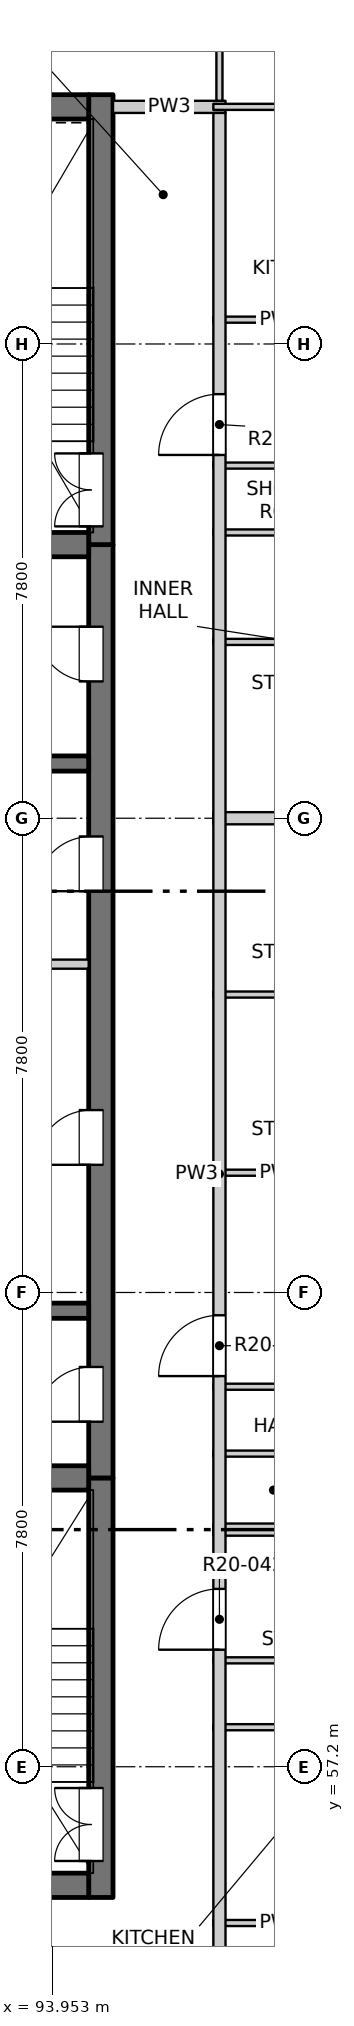
"""IFC4 building model, lengths in metres.
Left out: names, types, materials, properties, quantities, classifications, styles, units other than length and angle.
Written with IfcOpenShell. Run it as: python <this file> out.ifc"""

import sys

from ifc_helpers import new_model, si_unit, direction, frame, frame_2d, origin, place, context, subcontext, project, spatial, rectangle, extrude, element, fill, save


model = new_model("IFC4")
c1 = context("Model", 3, precision=1e-05, world=origin(), true_north=direction((0.0, 1.0)))
c2 = subcontext(c1, "Body", "Model", "MODEL_VIEW")
j1 = project(units=[si_unit("LENGTHUNIT", "METRE"), si_unit("PLANEANGLEUNIT", "RADIAN")], contexts=[c1])
p1 = place(None, origin())
s1 = spatial("IfcSite", under=j1, at=p1, CompositionType="ELEMENT")
p2 = place(p1, origin())
s2 = spatial("IfcBuilding", under=s1, at=p2, CompositionType="ELEMENT")
p3 = place(p2, frame((0.0, 0.0, 204.1)))
s3 = spatial("IfcBuildingStorey", under=s2, at=p3, CompositionType="ELEMENT", Elevation=204.1)
p4 = place(p3, frame((94.75, 55.05, -0.25), z_axis=(0.0, 0.0, 1.0), x_axis=(0.0, 1.0, 0.0)))
e1 = element("IfcWall", 1, at=p4, inside=s3, PredefinedType="SOLIDWALL", context=c2, shape_type="SweptSolid", body=[
    extrude(rectangle(XDim=6.9, YDim=0.4, at=frame_2d((3.45, 0.0))), origin(), (0.0, 0.0, 1.0), 3.4),
])
p5 = place(p4, frame((0.6, 0.0, 0.25)))
e2 = element("IfcOpeningElement", 2, at=p5, cuts=e1, PredefinedType="OPENING", context=c2, shape_type="SweptSolid", body=[
    extrude(rectangle(XDim=1.2, YDim=2.1, at=frame_2d((0.6, 1.05))), frame((0.0, 0.21, 0.0), z_axis=(0.0, -1.0, 0.0), x_axis=(1.0, 0.0, 0.0)), (0.0, 0.0, 1.0), 0.42),
])
p6 = place(p3, frame((94.75, 61.95, -0.25), z_axis=(0.0, 0.0, 1.0), x_axis=(0.0, 1.0, 0.0)))
e3 = element("IfcWall", 3, at=p6, inside=s3, PredefinedType="SOLIDWALL", context=c2, shape_type="SweptSolid", body=[
    extrude(rectangle(XDim=15.35, YDim=0.4, at=frame_2d((7.675, 0.0))), origin(), (0.0, 0.0, 1.0), 3.4),
])
p7 = place(p6, frame((0.925, 0.0, 0.25)))
e4 = element("IfcOpeningElement", 4, at=p7, cuts=e3, PredefinedType="OPENING", context=c2, shape_type="SweptSolid", body=[
    extrude(rectangle(XDim=0.9, YDim=2.1, at=frame_2d((0.45, 1.05))), frame((0.0, 0.21, 0.0), z_axis=(0.0, -1.0, 0.0), x_axis=(1.0, 0.0, 0.0)), (0.0, 0.0, 1.0), 0.42),
])
p8 = place(p6, frame((5.15, 0.0, 0.25)))
e5 = element("IfcOpeningElement", 5, at=p8, cuts=e3, PredefinedType="OPENING", context=c2, shape_type="SweptSolid", body=[
    extrude(rectangle(XDim=0.9, YDim=2.1, at=frame_2d((0.45, 1.05))), frame((0.0, 0.21, 0.0), z_axis=(0.0, -1.0, 0.0), x_axis=(1.0, 0.0, 0.0)), (0.0, 0.0, 1.0), 0.42),
])
p9 = place(p6, frame((9.65, 0.0, 0.25)))
e6 = element("IfcOpeningElement", 6, at=p9, cuts=e3, PredefinedType="OPENING", context=c2, shape_type="SweptSolid", body=[
    extrude(rectangle(XDim=0.9, YDim=2.1, at=frame_2d((0.45, 1.05))), frame((0.0, 0.21, 0.0), z_axis=(0.0, -1.0, 0.0), x_axis=(1.0, 0.0, 0.0)), (0.0, 0.0, 1.0), 0.42),
])
p10 = place(p6, frame((13.1, 0.0, 0.25)))
e7 = element("IfcOpeningElement", 7, at=p10, cuts=e3, PredefinedType="OPENING", context=c2, shape_type="SweptSolid", body=[
    extrude(rectangle(XDim=0.9, YDim=2.1, at=frame_2d((0.45, 1.05))), frame((0.0, 0.21, 0.0), z_axis=(0.0, -1.0, 0.0), x_axis=(1.0, 0.0, 0.0)), (0.0, 0.0, 1.0), 0.42),
])
p11 = place(p3, frame((94.75, 77.3, -0.25), z_axis=(0.0, 0.0, 1.0), x_axis=(0.0, 1.0, 0.0)))
e8 = element("IfcWall", 8, at=p11, inside=s3, PredefinedType="SOLIDWALL", context=c2, shape_type="SweptSolid", body=[
    extrude(rectangle(XDim=7.4, YDim=0.4, at=frame_2d((3.7, 0.0))), origin(), (0.0, 0.0, 1.0), 3.4),
])
p12 = place(p11, frame((0.3, 0.0, 0.25)))
e9 = element("IfcOpeningElement", 9, at=p12, cuts=e8, PredefinedType="OPENING", context=c2, shape_type="SweptSolid", body=[
    extrude(rectangle(XDim=1.2, YDim=2.1, at=frame_2d((0.6, 1.05))), frame((0.0, 0.21, 0.0), z_axis=(0.0, -1.0, 0.0), x_axis=(1.0, 0.0, 0.0)), (0.0, 0.0, 1.0), 0.42),
])
p13 = place(p3, frame((75.45, 55.25, -0.25), z_axis=(0.0, 0.0, 1.0), x_axis=(1.0, 0.0, 0.0)))
e10 = element("IfcWall", 10, at=p13, inside=s3, PredefinedType="SOLIDWALL", context=c2, shape_type="SweptSolid", body=[
    extrude(rectangle(XDim=19.1, YDim=0.4, at=frame_2d((9.55, 0.0))), origin(), (0.0, 0.0, 1.0), 3.4),
])
p14 = place(p13, frame((8.8, 0.0, 0.25)))
e11 = element("IfcOpeningElement", 11, at=p14, cuts=e10, PredefinedType="OPENING", context=c2, shape_type="SweptSolid", body=[
    extrude(rectangle(XDim=1.5, YDim=2.1, at=frame_2d((0.75, 1.05))), frame((0.0, 0.21, 0.0), z_axis=(0.0, -1.0, 0.0), x_axis=(1.0, 0.0, 0.0)), (0.0, 0.0, 1.0), 0.42),
])
p15 = place(p3, frame((75.45, 84.5, -0.25), z_axis=(0.0, 0.0, 1.0), x_axis=(1.0, 0.0, 0.0)))
e12 = element("IfcWall", 12, at=p15, inside=s3, PredefinedType="SOLIDWALL", context=c2, shape_type="SweptSolid", body=[
    extrude(rectangle(XDim=19.1, YDim=0.4, at=frame_2d((9.55, 0.0))), origin(), (0.0, 0.0, 1.0), 3.4),
])
p16 = place(p3, frame((90.675, 61.95, -0.25), z_axis=(0.0, 0.0, 1.0), x_axis=(1.0, 0.0, 0.0)))
e13 = element("IfcWall", 13, at=p16, inside=s3, PredefinedType="SOLIDWALL", context=c2, shape_type="SweptSolid", body=[
    extrude(rectangle(XDim=3.875, YDim=0.4, at=frame_2d((1.938, 0.0))), origin(), (0.0, 0.0, 1.0), 3.4),
])
for number, where, z_axis, x_axis in (
    (14, (90.675, 64.7, -0.25), (0.0, 0.0, 1.0), (1.0, 0.0, 0.0)),
    (15, (90.675, 73.7, -0.25), (0.0, 0.0, 1.0), (1.0, 0.0, 0.0)),
):
    element("IfcWall", number, at=place(p3, frame(where, z_axis=z_axis, x_axis=x_axis)), inside=s3, PredefinedType="SOLIDWALL", context=c2, shape_type="SweptSolid", body=[
        extrude(rectangle(XDim=3.875, YDim=0.25, at=frame_2d((1.938, 0.0))), origin(), (0.0, 0.0, 1.0), 3.4),
    ])
p17 = place(p3, frame((90.675, 77.3, -0.25), z_axis=(0.0, 0.0, 1.0), x_axis=(1.0, 0.0, 0.0)))
e16 = element("IfcWall", 16, at=p17, inside=s3, PredefinedType="SOLIDWALL", context=c2, shape_type="SweptSolid", body=[
    extrude(rectangle(XDim=3.875, YDim=0.4, at=frame_2d((1.938, 0.0))), origin(), (0.0, 0.0, 1.0), 3.4),
])
for number, where, z_axis, x_axis in (
    (17, (96.6, 54.63, 0.0), (0.0, 0.0, 1.0), (1.0, 0.0, 0.0)),
    (18, (96.6, 57.85, 0.0), (0.0, 0.0, 1.0), (1.0, 0.0, 0.0)),
    (19, (96.6, 58.95, 0.0), (0.0, 0.0, 1.0), (1.0, 0.0, 0.0)),
):
    element("IfcWall", number, at=place(p3, frame(where, z_axis=z_axis, x_axis=x_axis)), inside=s3, PredefinedType="PARTITIONING", context=c2, shape_type="SweptSolid", body=[
        extrude(rectangle(XDim=2.22, YDim=0.1, at=frame_2d((1.11, 0.0))), origin(), (0.0, 0.0, 1.0), 3.15),
    ])
p18 = place(p3, frame((96.6, 61.1, 0.0), z_axis=(0.0, 0.0, 1.0), x_axis=(1.0, 0.0, 0.0)))
e20 = element("IfcWall", 20, at=p18, inside=s3, PredefinedType="PARTITIONING", context=c2, shape_type="SweptSolid", body=[
    extrude(rectangle(XDim=11.5, YDim=0.2, at=frame_2d((5.75, 0.0))), origin(), (0.0, 0.0, 1.0), 2.55),
])
for number, where, z_axis, x_axis in (
    (21, (96.6, 62.35, 0.0), (0.0, 0.0, 1.0), (1.0, 0.0, 0.0)),
    (22, (96.6, 63.45, 0.0), (0.0, 0.0, 1.0), (1.0, 0.0, 0.0)),
    (23, (96.6, 66.97, 0.0), (0.0, 0.0, 1.0), (1.0, 0.0, 0.0)),
    (24, (96.6, 69.9, 0.0), (0.0, 0.0, 1.0), (1.0, 0.0, 0.0)),
):
    element("IfcWall", number, at=place(p3, frame(where, z_axis=z_axis, x_axis=x_axis)), inside=s3, PredefinedType="PARTITIONING", context=c2, shape_type="SweptSolid", body=[
        extrude(rectangle(XDim=2.22, YDim=0.1, at=frame_2d((1.11, 0.0))), origin(), (0.0, 0.0, 1.0), 3.15),
    ])
p19 = place(p3, frame((90.675, 70.4, 0.0), z_axis=(0.0, 0.0, 1.0), x_axis=(1.0, 0.0, 0.0)))
e25 = element("IfcWall", 25, at=p19, inside=s3, PredefinedType="PARTITIONING", context=c2, shape_type="SweptSolid", body=[
    extrude(rectangle(XDim=3.875, YDim=0.15, at=frame_2d((1.938, 0.0))), origin(), (0.0, 0.0, 1.0), 3.15),
])
p20 = place(p3, frame((96.6, 72.8, 0.0), z_axis=(0.0, 0.0, 1.0), x_axis=(1.0, 0.0, 0.0)))
e26 = element("IfcWall", 26, at=p20, inside=s3, PredefinedType="PARTITIONING", context=c2, shape_type="SweptSolid", body=[
    extrude(rectangle(XDim=11.5, YDim=0.2, at=frame_2d((5.75, 0.0))), origin(), (0.0, 0.0, 1.0), 3.15),
])
for number, where, z_axis, x_axis in (
    (27, (96.6, 75.7, 0.0), (0.0, 0.0, 1.0), (1.0, 0.0, 0.0)),
    (28, (96.6, 77.5, 0.0), (0.0, 0.0, 1.0), (1.0, 0.0, 0.0)),
    (29, (96.6, 78.6, 0.0), (0.0, 0.0, 1.0), (1.0, 0.0, 0.0)),
    (30, (96.6, 81.0, 0.0), (0.0, 0.0, 1.0), (1.0, 0.0, 0.0)),
):
    element("IfcWall", number, at=place(p3, frame(where, z_axis=z_axis, x_axis=x_axis)), inside=s3, PredefinedType="PARTITIONING", context=c2, shape_type="SweptSolid", body=[
        extrude(rectangle(XDim=2.22, YDim=0.1, at=frame_2d((1.11, 0.0))), origin(), (0.0, 0.0, 1.0), 3.15),
    ])
p21 = place(p3, frame((94.95, 84.5, 0.0), z_axis=(0.0, 0.0, 1.0), x_axis=(1.0, 0.0, 0.0)))
e31 = element("IfcWall", 31, at=p21, inside=s3, PredefinedType="PARTITIONING", context=c2, shape_type="SweptSolid", body=[
    extrude(rectangle(XDim=1.85, YDim=0.2, at=frame_2d((0.925, 0.0))), origin(), (0.0, 0.0, 1.0), 3.15),
])
p22 = place(p3, frame((96.6, 84.5, 0.0), z_axis=(0.0, 0.0, 1.0), x_axis=(1.0, 0.0, 0.0)))
e32 = element("IfcWall", 32, at=p22, inside=s3, PredefinedType="PARTITIONING", context=c2, shape_type="SweptSolid", body=[
    extrude(rectangle(XDim=11.5, YDim=0.1, at=frame_2d((5.75, 0.0))), origin(), (0.0, 0.0, 1.0), 3.15),
])
p23 = place(p22, frame((2.635, 0.0, 0.0)))
e33 = element("IfcOpeningElement", 33, at=p23, cuts=e32, PredefinedType="OPENING", context=c2, shape_type="SweptSolid", body=[
    extrude(rectangle(XDim=0.9, YDim=2.1, at=frame_2d((0.45, 1.05))), frame((0.0, 0.06, 0.0), z_axis=(0.0, -1.0, 0.0), x_axis=(1.0, 0.0, 0.0)), (0.0, 0.0, 1.0), 0.12),
])
p24 = place(p3, frame((96.7, 49.5, 0.0), z_axis=(0.0, 0.0, 1.0), x_axis=(0.0, 1.0, 0.0)))
e34 = element("IfcWall", 34, at=p24, inside=s3, PredefinedType="PARTITIONING", context=c2, shape_type="SweptSolid", body=[
    extrude(rectangle(XDim=34.9, YDim=0.2, at=frame_2d((17.45, 0.0))), origin(), (0.0, 0.0, 1.0), 3.15),
])
p25 = place(p24, frame((9.625, 0.0, 0.0)))
e35 = element("IfcOpeningElement", 35, at=p25, cuts=e34, PredefinedType="OPENING", context=c2, shape_type="SweptSolid", body=[
    extrude(rectangle(XDim=1.0, YDim=2.1, at=frame_2d((0.5, 1.05))), frame((0.0, 0.11, 0.0), z_axis=(0.0, -1.0, 0.0), x_axis=(1.0, 0.0, 0.0)), (0.0, 0.0, 1.0), 0.22),
])
p26 = place(p24, frame((14.125, 0.0, 0.0)))
e36 = element("IfcOpeningElement", 36, at=p26, cuts=e34, PredefinedType="OPENING", context=c2, shape_type="SweptSolid", body=[
    extrude(rectangle(XDim=1.0, YDim=2.1, at=frame_2d((0.5, 1.05))), frame((0.0, 0.11, 0.0), z_axis=(0.0, -1.0, 0.0), x_axis=(1.0, 0.0, 0.0)), (0.0, 0.0, 1.0), 0.22),
])
p27 = place(p24, frame((29.275, 0.0, 0.0)))
e37 = element("IfcOpeningElement", 37, at=p27, cuts=e34, PredefinedType="OPENING", context=c2, shape_type="SweptSolid", body=[
    extrude(rectangle(XDim=1.0, YDim=2.1, at=frame_2d((0.5, 1.05))), frame((0.0, 0.11, 0.0), z_axis=(0.0, -1.0, 0.0), x_axis=(1.0, 0.0, 0.0)), (0.0, 0.0, 1.0), 0.22),
])
p28 = place(p3, frame((96.7, 84.6, 0.0), z_axis=(0.0, 0.0, 1.0), x_axis=(0.0, 1.0, 0.0)))
e38 = element("IfcWall", 38, at=p28, inside=s3, PredefinedType="PARTITIONING", context=c2, shape_type="SweptSolid", body=[
    extrude(rectangle(XDim=3.5, YDim=0.1, at=frame_2d((1.75, 0.0))), origin(), (0.0, 0.0, 1.0), 3.15),
])
p29 = place(p28, frame((1.4, 0.0, 0.0)))
e39 = element("IfcOpeningElement", 39, at=p29, cuts=e38, PredefinedType="OPENING", context=c2, shape_type="SweptSolid", body=[
    extrude(rectangle(XDim=0.9, YDim=2.1, at=frame_2d((0.45, 1.05))), frame((0.0, 0.06, 0.0), z_axis=(0.0, -1.0, 0.0), x_axis=(1.0, 0.0, 0.0)), (0.0, 0.0, 1.0), 0.12),
])
p30 = place(p5, origin())
e40 = element("IfcDoor", 40, at=p30, inside=s3, OperationType="DOUBLE_DOOR_SINGLE_SWING", PredefinedType="DOOR", context=c2, shape_type="SweptSolid", body=[
    extrude(rectangle(XDim=1.2, YDim=2.1, at=frame_2d((0.6, 1.05))), frame((0.0, 0.185, 0.0), z_axis=(0.0, -1.0, 0.0), x_axis=(1.0, 0.0, 0.0)), (0.0, 0.0, 1.0), 0.05),
])
fill(e2, e40)
p31 = place(p25, origin())
e41 = element("IfcDoor", 41, at=p31, inside=s3, OperationType="SINGLE_SWING_LEFT", PredefinedType="DOOR", context=c2, shape_type="SweptSolid", body=[
    extrude(rectangle(XDim=1.0, YDim=2.1, at=frame_2d((0.5, 1.05))), frame((0.0, 0.025, 0.0), z_axis=(0.0, -1.0, 0.0), x_axis=(1.0, 0.0, 0.0)), (0.0, 0.0, 1.0), 0.05),
])
fill(e35, e41)
p32 = place(p7, origin())
e42 = element("IfcDoor", 42, at=p32, inside=s3, OperationType="SINGLE_SWING_LEFT", PredefinedType="DOOR", context=c2, shape_type="SweptSolid", body=[
    extrude(rectangle(XDim=0.9, YDim=2.1, at=frame_2d((0.45, 1.05))), frame((0.0, 0.185, 0.0), z_axis=(0.0, -1.0, 0.0), x_axis=(1.0, 0.0, 0.0)), (0.0, 0.0, 1.0), 0.05),
])
fill(e4, e42)
p33 = place(p26, origin())
e43 = element("IfcDoor", 43, at=p33, inside=s3, OperationType="SINGLE_SWING_LEFT", PredefinedType="DOOR", context=c2, shape_type="SweptSolid", body=[
    extrude(rectangle(XDim=1.0, YDim=2.1, at=frame_2d((0.5, 1.05))), frame((0.0, 0.025, 0.0), z_axis=(0.0, -1.0, 0.0), x_axis=(1.0, 0.0, 0.0)), (0.0, 0.0, 1.0), 0.05),
])
fill(e36, e43)
p34 = place(p8, origin())
e44 = element("IfcDoor", 44, at=p34, inside=s3, OperationType="SINGLE_SWING_LEFT", PredefinedType="DOOR", context=c2, shape_type="SweptSolid", body=[
    extrude(rectangle(XDim=0.9, YDim=2.1, at=frame_2d((0.45, 1.05))), frame((0.0, 0.185, 0.0), z_axis=(0.0, -1.0, 0.0), x_axis=(1.0, 0.0, 0.0)), (0.0, 0.0, 1.0), 0.05),
])
fill(e5, e44)
p35 = place(p9, origin())
e45 = element("IfcDoor", 45, at=p35, inside=s3, OperationType="SINGLE_SWING_LEFT", PredefinedType="DOOR", context=c2, shape_type="SweptSolid", body=[
    extrude(rectangle(XDim=0.9, YDim=2.1, at=frame_2d((0.45, 1.05))), frame((0.0, 0.185, 0.0), z_axis=(0.0, -1.0, 0.0), x_axis=(1.0, 0.0, 0.0)), (0.0, 0.0, 1.0), 0.05),
])
fill(e6, e45)
p36 = place(p10, origin())
e46 = element("IfcDoor", 46, at=p36, inside=s3, OperationType="SINGLE_SWING_RIGHT", PredefinedType="DOOR", context=c2, shape_type="SweptSolid", body=[
    extrude(rectangle(XDim=0.9, YDim=2.1, at=frame_2d((0.45, 1.05))), frame((0.0, 0.185, 0.0), z_axis=(0.0, -1.0, 0.0), x_axis=(1.0, 0.0, 0.0)), (0.0, 0.0, 1.0), 0.05),
])
fill(e7, e46)
p37 = place(p12, origin())
e47 = element("IfcDoor", 47, at=p37, inside=s3, OperationType="DOUBLE_DOOR_SINGLE_SWING", PredefinedType="DOOR", context=c2, shape_type="SweptSolid", body=[
    extrude(rectangle(XDim=1.2, YDim=2.1, at=frame_2d((0.6, 1.05))), frame((0.0, 0.185, 0.0), z_axis=(0.0, -1.0, 0.0), x_axis=(1.0, 0.0, 0.0)), (0.0, 0.0, 1.0), 0.05),
])
fill(e9, e47)
p38 = place(p27, origin())
e48 = element("IfcDoor", 48, at=p38, inside=s3, OperationType="SINGLE_SWING_LEFT", PredefinedType="DOOR", context=c2, shape_type="SweptSolid", body=[
    extrude(rectangle(XDim=1.0, YDim=2.1, at=frame_2d((0.5, 1.05))), frame((0.0, 0.025, 0.0), z_axis=(0.0, -1.0, 0.0), x_axis=(1.0, 0.0, 0.0)), (0.0, 0.0, 1.0), 0.05),
])
fill(e37, e48)
save(model, sys.argv[1])
